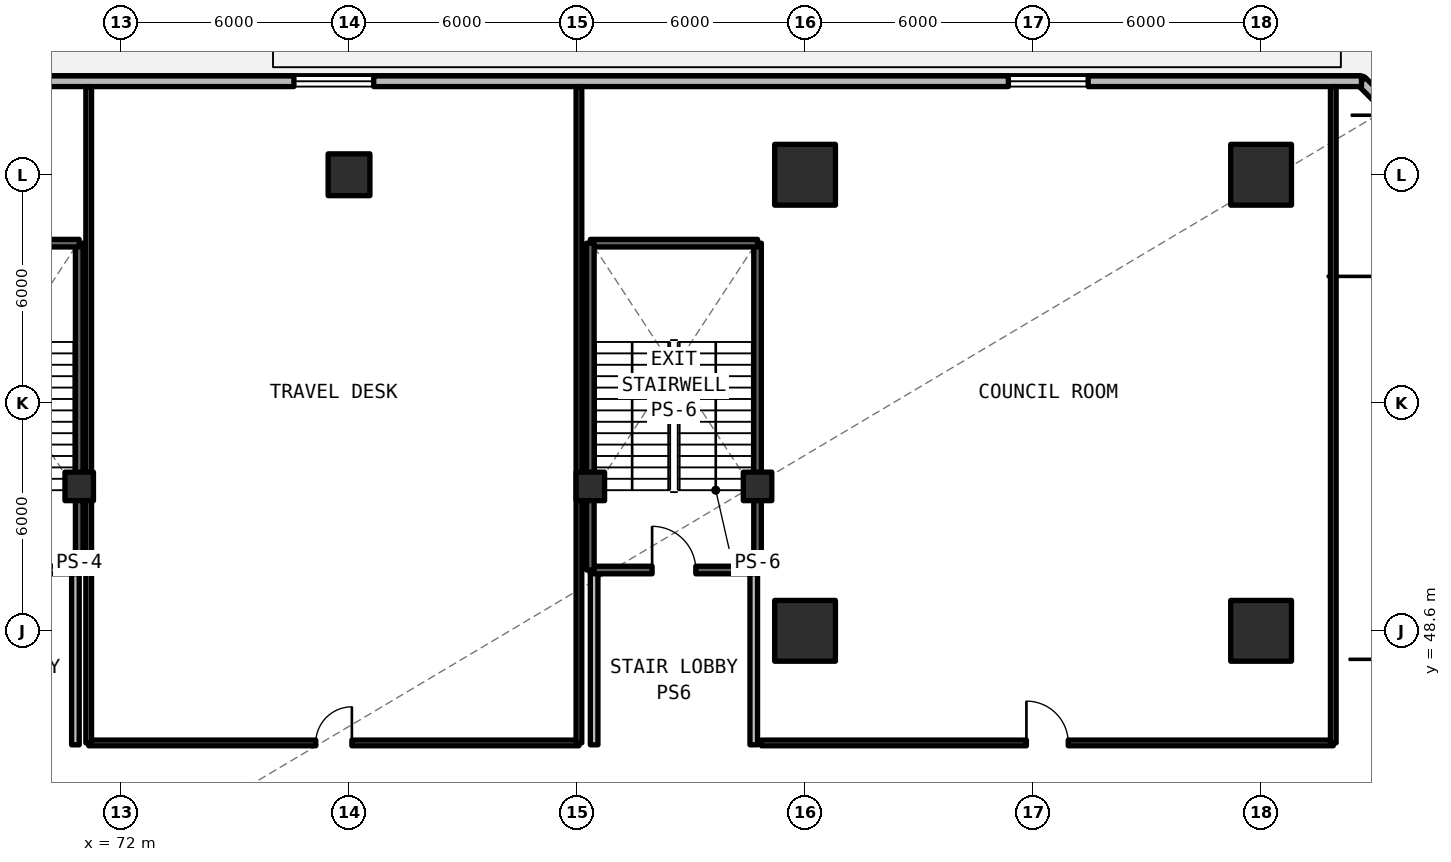
"""IFC4 building model, lengths in metres.
Left out: names, types, materials, properties, quantities, classifications, styles, units other than length and angle.
Written with IfcOpenShell. Run it as: python <this file> out.ifc"""

import sys

from ifc_helpers import new_model, si_unit, direction, frame, frame_2d, origin, origin_2d, place, context, subcontext, project, spatial, rectangle, circle, extrude, element, fill, save


model = new_model("IFC4")
c1 = context("Model", 3, precision=1e-05, world=origin(), true_north=direction((0.0, 1.0)))
c2 = subcontext(c1, "Body", "Model", "MODEL_VIEW")
j1 = project(units=[si_unit("LENGTHUNIT", "METRE"), si_unit("PLANEANGLEUNIT", "RADIAN")], contexts=[c1])
p1 = place(None, origin())
s1 = spatial("IfcSite", under=j1, at=p1, CompositionType="ELEMENT")
p2 = place(p1, origin())
s2 = spatial("IfcBuilding", under=s1, at=p2, CompositionType="ELEMENT")
p3 = place(p2, frame((0.0, 0.0, 19.47)))
s3 = spatial("IfcBuildingStorey", under=s2, at=p3, CompositionType="ELEMENT", Elevation=19.47)
p4 = place(p3, frame((78.0, 60.6, 0.0), z_axis=(0.0, 0.0, 1.0), x_axis=(1.0, 0.0, 0.0)))
e1 = element("IfcColumn", 1, at=p4, inside=s3, PredefinedType="COLUMN", context=c2, shape_type="SweptSolid", body=[
    extrude(circle(Radius=0.55, at=origin_2d()), origin(), (0.0, 0.0, 1.0), 4.62),
])
for number, where, z_axis, x_axis in (
    (2, (90.0, 60.6, 0.0), (0.0, 0.0, 1.0), (1.0, 0.0, 0.0)),
    (3, (102.0, 60.6, 0.0), (0.0, 0.0, 1.0), (1.0, 0.0, 0.0)),
    (4, (90.0, 48.6, 0.0), (0.0, 0.0, 1.0), (1.0, 0.0, 0.0)),
    (5, (102.0, 48.6, 0.0), (0.0, 0.0, 1.0), (1.0, 0.0, 0.0)),
):
    element("IfcColumn", number, at=place(p3, frame(where, z_axis=z_axis, x_axis=x_axis)), inside=s3, PredefinedType="COLUMN", context=c2, shape_type="SweptSolid", body=[
        extrude(rectangle(XDim=1.6, YDim=1.6, at=origin_2d()), origin(), (0.0, 0.0, 1.0), 4.62),
    ])
for number, where, z_axis, x_axis in (
    (6, (70.9, 52.4, 0.0), (0.0, 0.0, 1.0), (1.0, 0.0, 0.0)),
    (7, (84.35, 52.4, 0.0), (0.0, 0.0, 1.0), (1.0, 0.0, 0.0)),
    (8, (88.75, 52.4, 0.0), (0.0, 0.0, 1.0), (1.0, 0.0, 0.0)),
):
    element("IfcColumn", number, at=place(p3, frame(where, z_axis=z_axis, x_axis=x_axis)), inside=s3, PredefinedType="COLUMN", context=c2, shape_type="SweptSolid", body=[
        extrude(rectangle(XDim=0.75, YDim=0.75, at=origin_2d()), origin(), (0.0, 0.0, 1.0), 4.27),
    ])
p5 = place(p3, frame((106.66, 61.042, 0.0), z_axis=(0.0, 0.0, 1.0), x_axis=(-0.707064005301, 0.707149554485, 0.0)))
e9 = element("IfcWall", 9, at=p5, inside=s3, PredefinedType="SOLIDWALL", context=c2, shape_type="SweptSolid", body=[
    extrude(rectangle(XDim=2.854, YDim=0.28, at=frame_2d((1.427, 0.0))), origin(), (0.0, 0.0, 1.0), 4.27),
])
p6 = place(p5, frame((0.727, 0.0, 0.78)))
e10 = element("IfcOpeningElement", 10, at=p6, cuts=e9, PredefinedType="OPENING", context=c2, shape_type="SweptSolid", body=[
    extrude(rectangle(XDim=1.4, YDim=1.65, at=frame_2d((0.7, 0.825))), frame((0.0, 0.15, 0.0), z_axis=(0.0, -1.0, 0.0), x_axis=(1.0, 0.0, 0.0)), (0.0, 0.0, 1.0), 0.3),
])
p7 = place(p3, frame((104.642, 63.06, 0.0), z_axis=(0.0, 0.0, 1.0), x_axis=(-1.0, 0.0, 0.0)))
e11 = element("IfcWall", 11, at=p7, inside=s3, PredefinedType="SOLIDWALL", context=c2, shape_type="SweptSolid", body=[
    extrude(rectangle(XDim=95.284, YDim=0.28, at=frame_2d((47.642, 0.0))), origin(), (0.0, 0.0, 1.0), 4.27),
])
p8 = place(p7, frame((47.892, 0.0, 0.0)))
e12 = element("IfcOpeningElement", 12, at=p8, cuts=e11, PredefinedType="OPENING", context=c2, shape_type="SweptSolid", body=[
    extrude(rectangle(XDim=1.5, YDim=2.2, at=frame_2d((0.75, 1.1))), frame((0.0, 0.15, 0.0), z_axis=(0.0, -1.0, 0.0), x_axis=(1.0, 0.0, 0.0)), (0.0, 0.0, 1.0), 0.3),
])
p9 = place(p7, frame((86.192, 0.0, 0.78)))
e13 = element("IfcOpeningElement", 13, at=p9, cuts=e11, PredefinedType="OPENING", context=c2, shape_type="SweptSolid", body=[
    extrude(rectangle(XDim=2.1, YDim=1.66, at=frame_2d((1.05, 0.83))), frame((0.0, 0.15, 0.0), z_axis=(0.0, -1.0, 0.0), x_axis=(1.0, 0.0, 0.0)), (0.0, 0.0, 1.0), 0.3),
])
p10 = place(p7, frame((68.992, 0.0, 0.78)))
e14 = element("IfcOpeningElement", 14, at=p10, cuts=e11, PredefinedType="OPENING", context=c2, shape_type="SweptSolid", body=[
    extrude(rectangle(XDim=2.1, YDim=1.66, at=frame_2d((1.05, 0.83))), frame((0.0, 0.15, 0.0), z_axis=(0.0, -1.0, 0.0), x_axis=(1.0, 0.0, 0.0)), (0.0, 0.0, 1.0), 0.3),
])
p11 = place(p7, frame((59.792, 0.0, 0.78)))
e15 = element("IfcOpeningElement", 15, at=p11, cuts=e11, PredefinedType="OPENING", context=c2, shape_type="SweptSolid", body=[
    extrude(rectangle(XDim=2.1, YDim=1.66, at=frame_2d((1.05, 0.83))), frame((0.0, 0.15, 0.0), z_axis=(0.0, -1.0, 0.0), x_axis=(1.0, 0.0, 0.0)), (0.0, 0.0, 1.0), 0.3),
])
p12 = place(p7, frame((41.692, 0.0, 0.78)))
e16 = element("IfcOpeningElement", 16, at=p12, cuts=e11, PredefinedType="OPENING", context=c2, shape_type="SweptSolid", body=[
    extrude(rectangle(XDim=2.1, YDim=1.66, at=frame_2d((1.05, 0.83))), frame((0.0, 0.15, 0.0), z_axis=(0.0, -1.0, 0.0), x_axis=(1.0, 0.0, 0.0)), (0.0, 0.0, 1.0), 0.3),
])
p13 = place(p7, frame((25.992, 0.0, 0.78)))
e17 = element("IfcOpeningElement", 17, at=p13, cuts=e11, PredefinedType="OPENING", context=c2, shape_type="SweptSolid", body=[
    extrude(rectangle(XDim=2.1, YDim=1.66, at=frame_2d((1.05, 0.83))), frame((0.0, 0.15, 0.0), z_axis=(0.0, -1.0, 0.0), x_axis=(1.0, 0.0, 0.0)), (0.0, 0.0, 1.0), 0.3),
])
p14 = place(p7, frame((7.192, 0.0, 0.78)))
e18 = element("IfcOpeningElement", 18, at=p14, cuts=e11, PredefinedType="OPENING", context=c2, shape_type="SweptSolid", body=[
    extrude(rectangle(XDim=2.1, YDim=1.66, at=frame_2d((1.05, 0.83))), frame((0.0, 0.15, 0.0), z_axis=(0.0, -1.0, 0.0), x_axis=(1.0, 0.0, 0.0)), (0.0, 0.0, 1.0), 0.3),
])
p15 = place(p7, frame((34.892, 0.0, 0.78)))
e19 = element("IfcOpeningElement", 19, at=p15, cuts=e11, PredefinedType="OPENING", context=c2, shape_type="SweptSolid", body=[
    extrude(rectangle(XDim=2.1, YDim=1.66, at=frame_2d((1.05, 0.83))), frame((0.0, 0.15, 0.0), z_axis=(0.0, -1.0, 0.0), x_axis=(1.0, 0.0, 0.0)), (0.0, 0.0, 1.0), 0.3),
])
p16 = place(p7, frame((76.192, 0.0, 0.78)))
e20 = element("IfcOpeningElement", 20, at=p16, cuts=e11, PredefinedType="OPENING", context=c2, shape_type="SweptSolid", body=[
    extrude(rectangle(XDim=2.1, YDim=1.66, at=frame_2d((1.05, 0.83))), frame((0.0, 0.15, 0.0), z_axis=(0.0, -1.0, 0.0), x_axis=(1.0, 0.0, 0.0)), (0.0, 0.0, 1.0), 0.3),
])
for number, where, z_axis, x_axis in (
    (21, (70.8, 45.6, 0.0), (0.0, 0.0, 1.0), (0.0, 1.0, 0.0)),
    (22, (84.45, 45.6, 0.0), (0.0, 0.0, 1.0), (0.0, 1.0, 0.0)),
    (23, (88.65, 45.6, 0.0), (0.0, 0.0, 1.0), (0.0, 1.0, 0.0)),
):
    element("IfcWall", number, at=place(p3, frame(where, z_axis=z_axis, x_axis=x_axis)), inside=s3, PredefinedType="SOLIDWALL", context=c2, shape_type="SweptSolid", body=[
        extrude(rectangle(XDim=4.6, YDim=0.2, at=frame_2d((2.3, 0.0))), origin(), (0.0, 0.0, 1.0), 3.49),
    ])
p17 = place(p3, frame((71.15, 45.65, 0.0), z_axis=(0.0, 0.0, 1.0), x_axis=(1.0, 0.0, 0.0)))
e24 = element("IfcWall", 24, at=p17, inside=s3, PredefinedType="SOLIDWALL", context=c2, shape_type="SweptSolid", body=[
    extrude(rectangle(XDim=12.9, YDim=0.15, at=frame_2d((6.45, 0.0))), origin(), (0.0, 0.0, 1.0), 3.49),
])
p18 = place(p17, frame((5.975, 0.0, 0.0)))
e25 = element("IfcOpeningElement", 25, at=p18, cuts=e24, PredefinedType="OPENING", context=c2, shape_type="SweptSolid", body=[
    extrude(rectangle(XDim=0.95, YDim=2.15, at=frame_2d((0.475, 1.075))), frame((0.0, 0.085, 0.0), z_axis=(0.0, -1.0, 0.0), x_axis=(1.0, 0.0, 0.0)), (0.0, 0.0, 1.0), 0.17),
])
for number, where, z_axis, x_axis in (
    (26, (71.15, 45.65, 0.0), (0.0, 0.0, 1.0), (0.0, 1.0, 0.0)),
    (27, (84.05, 45.65, 0.0), (0.0, 0.0, 1.0), (0.0, 1.0, 0.0)),
):
    element("IfcWall", number, at=place(p3, frame(where, z_axis=z_axis, x_axis=x_axis)), inside=s3, PredefinedType="SOLIDWALL", context=c2, shape_type="SweptSolid", body=[
        extrude(rectangle(XDim=17.27, YDim=0.15, at=frame_2d((8.635, 0.0))), origin(), (0.0, 0.0, 1.0), 3.49),
    ])
p19 = place(p3, frame((88.85, 45.65, 0.0), z_axis=(0.0, 0.0, 1.0), x_axis=(1.0, 0.0, 0.0)))
e28 = element("IfcWall", 28, at=p19, inside=s3, PredefinedType="SOLIDWALL", context=c2, shape_type="SweptSolid", body=[
    extrude(rectangle(XDim=15.05, YDim=0.15, at=frame_2d((7.525, 0.0))), origin(), (0.0, 0.0, 1.0), 3.49),
])
p20 = place(p19, frame((6.975, 0.0, 0.0)))
e29 = element("IfcOpeningElement", 29, at=p20, cuts=e28, PredefinedType="OPENING", context=c2, shape_type="SweptSolid", body=[
    extrude(rectangle(XDim=1.1, YDim=2.15, at=frame_2d((0.55, 1.075))), frame((0.0, 0.085, 0.0), z_axis=(0.0, -1.0, 0.0), x_axis=(1.0, 0.0, 0.0)), (0.0, 0.0, 1.0), 0.17),
])
p21 = place(p3, frame((103.9, 45.65, 0.0), z_axis=(0.0, 0.0, 1.0), x_axis=(0.0, 1.0, 0.0)))
e30 = element("IfcWall", 30, at=p21, inside=s3, PredefinedType="SOLIDWALL", context=c2, shape_type="SweptSolid", body=[
    extrude(rectangle(XDim=17.27, YDim=0.15, at=frame_2d((8.635, 0.0))), origin(), (0.0, 0.0, 1.0), 3.49),
])
p22 = place(p3, frame((66.5, 50.2, 0.0), z_axis=(0.0, 0.0, 1.0), x_axis=(1.0, 0.0, 0.0)))
e31 = element("IfcWall", 31, at=p22, inside=s3, PredefinedType="SOLIDWALL", context=c2, shape_type="SweptSolid", body=[
    extrude(rectangle(XDim=4.4, YDim=0.2, at=frame_2d((2.2, 0.0))), origin(), (0.0, 0.0, 1.0), 4.62),
])
p23 = place(p22, frame((1.625, 0.0, 0.0)))
e32 = element("IfcOpeningElement", 32, at=p23, cuts=e31, PredefinedType="OPENING", context=c2, shape_type="SweptSolid", body=[
    extrude(rectangle(XDim=1.15, YDim=2.15, at=frame_2d((0.575, 1.075))), frame((0.0, 0.11, 0.0), z_axis=(0.0, -1.0, 0.0), x_axis=(1.0, 0.0, 0.0)), (0.0, 0.0, 1.0), 0.22),
])
p24 = place(p3, frame((70.9, 50.2, 0.0), z_axis=(0.0, 0.0, 1.0), x_axis=(0.0, 1.0, 0.0)))
e33 = element("IfcWall", 33, at=p24, inside=s3, PredefinedType="SOLIDWALL", context=c2, shape_type="SweptSolid", body=[
    extrude(rectangle(XDim=8.6, YDim=0.2, at=frame_2d((4.3, 0.0))), origin(), (0.0, 0.0, 1.0), 4.62),
])
p25 = place(p3, frame((70.9, 58.8, 0.0), z_axis=(0.0, 0.0, 1.0), x_axis=(-1.0, 0.0, 0.0)))
e34 = element("IfcWall", 34, at=p25, inside=s3, PredefinedType="SOLIDWALL", context=c2, shape_type="SweptSolid", body=[
    extrude(rectangle(XDim=4.4, YDim=0.2, at=frame_2d((2.2, 0.0))), origin(), (0.0, 0.0, 1.0), 4.62),
])
p26 = place(p3, frame((84.35, 50.2, 0.0), z_axis=(0.0, 0.0, 1.0), x_axis=(1.0, 0.0, 0.0)))
e35 = element("IfcWall", 35, at=p26, inside=s3, PredefinedType="SOLIDWALL", context=c2, shape_type="SweptSolid", body=[
    extrude(rectangle(XDim=4.4, YDim=0.2, at=frame_2d((2.2, 0.0))), origin(), (0.0, 0.0, 1.0), 4.62),
])
p27 = place(p26, frame((1.625, 0.0, 0.0)))
e36 = element("IfcOpeningElement", 36, at=p27, cuts=e35, PredefinedType="OPENING", context=c2, shape_type="SweptSolid", body=[
    extrude(rectangle(XDim=1.15, YDim=2.15, at=frame_2d((0.575, 1.075))), frame((0.0, 0.11, 0.0), z_axis=(0.0, -1.0, 0.0), x_axis=(1.0, 0.0, 0.0)), (0.0, 0.0, 1.0), 0.22),
])
p28 = place(p3, frame((88.75, 50.2, 0.0), z_axis=(0.0, 0.0, 1.0), x_axis=(0.0, 1.0, 0.0)))
e37 = element("IfcWall", 37, at=p28, inside=s3, PredefinedType="SOLIDWALL", context=c2, shape_type="SweptSolid", body=[
    extrude(rectangle(XDim=8.6, YDim=0.2, at=frame_2d((4.3, 0.0))), origin(), (0.0, 0.0, 1.0), 4.62),
])
p29 = place(p3, frame((88.75, 58.8, 0.0), z_axis=(0.0, 0.0, 1.0), x_axis=(-1.0, 0.0, 0.0)))
e38 = element("IfcWall", 38, at=p29, inside=s3, PredefinedType="SOLIDWALL", context=c2, shape_type="SweptSolid", body=[
    extrude(rectangle(XDim=4.4, YDim=0.2, at=frame_2d((2.2, 0.0))), origin(), (0.0, 0.0, 1.0), 4.62),
])
p30 = place(p3, frame((84.35, 58.8, 0.0), z_axis=(0.0, 0.0, 1.0), x_axis=(0.0, -1.0, 0.0)))
e39 = element("IfcWall", 39, at=p30, inside=s3, PredefinedType="SOLIDWALL", context=c2, shape_type="SweptSolid", body=[
    extrude(rectangle(XDim=8.6, YDim=0.2, at=frame_2d((4.3, 0.0))), origin(), (0.0, 0.0, 1.0), 4.62),
])
p31 = place(p13, origin())
e40 = element("IfcWindow", 40, at=p31, inside=s3, PartitioningType="SINGLE_PANEL", PredefinedType="WINDOW", context=c2, shape_type="SweptSolid", body=[
    extrude(rectangle(XDim=2.1, YDim=1.66, at=frame_2d((1.05, 0.83))), frame((0.0, 0.03, 0.0), z_axis=(0.0, -1.0, 0.0), x_axis=(1.0, 0.0, 0.0)), (0.0, 0.0, 1.0), 0.06),
])
fill(e17, e40)
p32 = place(p14, origin())
e41 = element("IfcWindow", 41, at=p32, inside=s3, PartitioningType="SINGLE_PANEL", PredefinedType="WINDOW", context=c2, shape_type="SweptSolid", body=[
    extrude(rectangle(XDim=2.1, YDim=1.66, at=frame_2d((1.05, 0.83))), frame((0.0, 0.03, 0.0), z_axis=(0.0, -1.0, 0.0), x_axis=(1.0, 0.0, 0.0)), (0.0, 0.0, 1.0), 0.06),
])
fill(e18, e41)
p33 = place(p18, origin())
e42 = element("IfcDoor", 42, at=p33, inside=s3, OperationType="SINGLE_SWING_RIGHT", PredefinedType="DOOR", context=c2, shape_type="SweptSolid", body=[
    extrude(rectangle(XDim=0.95, YDim=2.15, at=frame_2d((0.475, 1.075))), frame((0.0, 0.025, 0.0), z_axis=(0.0, -1.0, 0.0), x_axis=(1.0, 0.0, 0.0)), (0.0, 0.0, 1.0), 0.05),
])
fill(e25, e42)
p34 = place(p20, origin())
e43 = element("IfcDoor", 43, at=p34, inside=s3, OperationType="SINGLE_SWING_LEFT", PredefinedType="DOOR", context=c2, shape_type="SweptSolid", body=[
    extrude(rectangle(XDim=1.1, YDim=2.15, at=frame_2d((0.55, 1.075))), frame((0.0, 0.025, 0.0), z_axis=(0.0, -1.0, 0.0), x_axis=(1.0, 0.0, 0.0)), (0.0, 0.0, 1.0), 0.05),
])
fill(e29, e43)
p35 = place(p27, origin())
e44 = element("IfcDoor", 44, at=p35, inside=s3, OperationType="SINGLE_SWING_LEFT", PredefinedType="DOOR", context=c2, shape_type="SweptSolid", body=[
    extrude(rectangle(XDim=1.15, YDim=2.15, at=frame_2d((0.575, 1.075))), frame((0.0, 0.025, 0.0), z_axis=(0.0, -1.0, 0.0), x_axis=(1.0, 0.0, 0.0)), (0.0, 0.0, 1.0), 0.05),
])
fill(e36, e44)
save(model, sys.argv[1])
